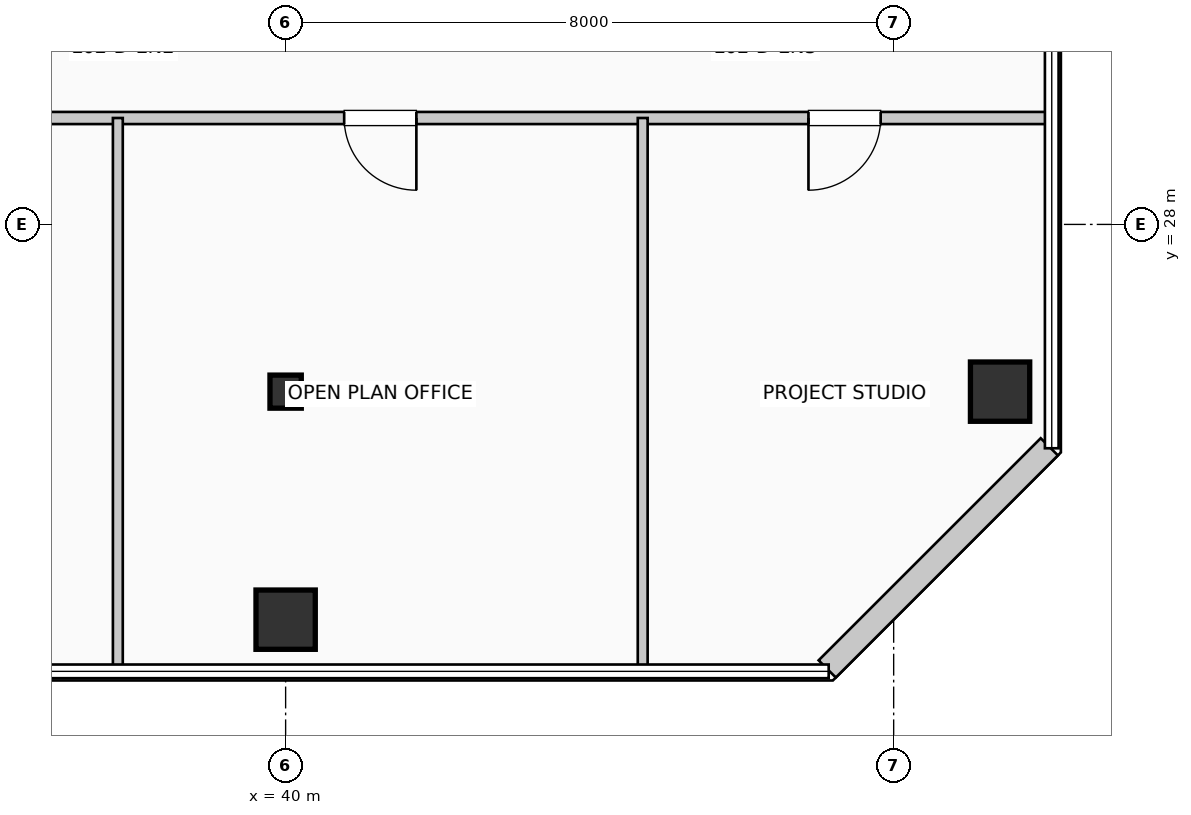
"""IFC4 building model, lengths in metres.
Left out: names, types, materials, properties, quantities, classifications, styles, units other than length and angle.
Written with IfcOpenShell. Run it as: python <this file> out.ifc"""

import sys

from ifc_helpers import new_model, si_unit, direction, frame, frame_2d, origin, origin_2d, place, context, subcontext, project, spatial, rectangle, i_section, extrude, element, fill, save


model = new_model("IFC4")
c1 = context("Model", 3, precision=1e-05, world=origin(), true_north=direction((0.0, 1.0)))
c2 = subcontext(c1, "Body", "Model", "MODEL_VIEW")
j1 = project(units=[si_unit("LENGTHUNIT", "METRE"), si_unit("PLANEANGLEUNIT", "RADIAN")], contexts=[c1])
p1 = place(None, origin())
s1 = spatial("IfcSite", under=j1, at=p1, CompositionType="ELEMENT")
p2 = place(p1, origin())
s2 = spatial("IfcBuilding", under=s1, at=p2, CompositionType="ELEMENT")
p3 = place(p2, frame((0.0, 0.0, 256.41)))
s3 = spatial("IfcBuildingStorey", under=s2, at=p3, CompositionType="ELEMENT", Elevation=256.41)
p4 = place(p3, frame((40.0, 22.8, 0.0), z_axis=(0.0, 0.0, 1.0), x_axis=(1.0, 0.0, 0.0)))
e1 = element("IfcColumn", 1, at=p4, inside=s3, PredefinedType="COLUMN", context=c2, shape_type="SweptSolid", body=[
    extrude(rectangle(XDim=0.78, YDim=0.78, at=origin_2d()), origin(), (0.0, 0.0, 1.0), 3.96),
])
p5 = place(p3, frame((40.0, 25.8, 0.0), z_axis=(0.0, 0.0, 1.0), x_axis=(1.0, 0.0, 0.0)))
e2 = element("IfcColumn", 2, at=p5, inside=s3, PredefinedType="COLUMN", context=c2, shape_type="SweptSolid", body=[
    extrude(i_section(OverallWidth=0.412, OverallDepth=0.435, WebThickness=0.027, FlangeThickness=0.043, at=origin_2d()), origin(), (0.0, 0.0, 1.0), 3.96),
])
p6 = place(p3, frame((49.4, 25.8, 0.0), z_axis=(0.0, 0.0, 1.0), x_axis=(1.0, 0.0, 0.0)))
e3 = element("IfcColumn", 3, at=p6, inside=s3, PredefinedType="COLUMN", context=c2, shape_type="SweptSolid", body=[
    extrude(rectangle(XDim=0.78, YDim=0.78, at=origin_2d()), origin(), (0.0, 0.0, 1.0), 3.96),
])
p7 = place(p3, frame((47.126, 22.152, 0.0), z_axis=(0.0, 0.0, 1.0), x_axis=(0.707136318428, 0.707077242712, 0.0)))
e4 = element("IfcWall", 4, at=p7, inside=s3, PredefinedType="SOLIDWALL", context=c2, shape_type="SweptSolid", body=[
    extrude(rectangle(XDim=4.133, YDim=0.32, at=frame_2d((2.066, 0.0))), origin(), (0.0, 0.0, 1.0), 3.71),
])
p8 = place(p3, frame((23.45, 29.4, 0.0), z_axis=(0.0, 0.0, 1.0), x_axis=(1.0, 0.0, 0.0)))
e5 = element("IfcWall", 5, at=p8, inside=s3, PredefinedType="PARTITIONING", context=c2, shape_type="SweptSolid", body=[
    extrude(rectangle(XDim=26.56, YDim=0.16, at=frame_2d((13.28, 0.0))), origin(), (0.0, 0.0, 1.0), 3.365),
])
p9 = place(p8, frame((3.928, 0.0, 0.0), z_axis=(0.0, 0.0, 1.0), x_axis=(-1.0, 0.0, 0.0)))
e6 = element("IfcOpeningElement", 6, at=p9, cuts=e5, PredefinedType="OPENING", context=c2, shape_type="SweptSolid", body=[
    extrude(rectangle(XDim=0.95, YDim=2.15, at=frame_2d((0.475, 1.075))), frame((0.0, 0.09, 0.0), z_axis=(0.0, -1.0, 0.0), x_axis=(1.0, 0.0, 0.0)), (0.0, 0.0, 1.0), 0.18),
])
p10 = place(p8, frame((11.099, 0.0, 0.0), z_axis=(0.0, 0.0, 1.0), x_axis=(-1.0, 0.0, 0.0)))
e7 = element("IfcOpeningElement", 7, at=p10, cuts=e5, PredefinedType="OPENING", context=c2, shape_type="SweptSolid", body=[
    extrude(rectangle(XDim=0.95, YDim=2.15, at=frame_2d((0.475, 1.075))), frame((0.0, 0.09, 0.0), z_axis=(0.0, -1.0, 0.0), x_axis=(1.0, 0.0, 0.0)), (0.0, 0.0, 1.0), 0.18),
])
p11 = place(p8, frame((18.27, 0.0, 0.0), z_axis=(0.0, 0.0, 1.0), x_axis=(-1.0, 0.0, 0.0)))
e8 = element("IfcOpeningElement", 8, at=p11, cuts=e5, PredefinedType="OPENING", context=c2, shape_type="SweptSolid", body=[
    extrude(rectangle(XDim=0.95, YDim=2.15, at=frame_2d((0.475, 1.075))), frame((0.0, 0.09, 0.0), z_axis=(0.0, -1.0, 0.0), x_axis=(1.0, 0.0, 0.0)), (0.0, 0.0, 1.0), 0.18),
])
p12 = place(p8, frame((24.379, 0.0, 0.0), z_axis=(0.0, 0.0, 1.0), x_axis=(-1.0, 0.0, 0.0)))
e9 = element("IfcOpeningElement", 9, at=p12, cuts=e5, PredefinedType="OPENING", context=c2, shape_type="SweptSolid", body=[
    extrude(rectangle(XDim=0.95, YDim=2.15, at=frame_2d((0.475, 1.075))), frame((0.0, 0.09, 0.0), z_axis=(0.0, -1.0, 0.0), x_axis=(1.0, 0.0, 0.0)), (0.0, 0.0, 1.0), 0.18),
])
for number, where, z_axis, x_axis in (
    (10, (37.792, 22.19, 0.0), (0.0, 0.0, 1.0), (0.0, 1.0, 0.0)),
    (11, (44.698, 22.19, 0.0), (0.0, 0.0, 1.0), (0.0, 1.0, 0.0)),
):
    element("IfcWall", number, at=place(p3, frame(where, z_axis=z_axis, x_axis=x_axis)), inside=s3, PredefinedType="PARTITIONING", context=c2, shape_type="SweptSolid", body=[
        extrude(rectangle(XDim=7.21, YDim=0.13, at=frame_2d((3.605, 0.0))), origin(), (0.0, 0.0, 1.0), 3.71),
    ])
p13 = place(p11, origin())
e12 = element("IfcDoor", 12, at=p13, inside=s3, OperationType="SINGLE_SWING_RIGHT", PredefinedType="DOOR", context=c2, shape_type="SweptSolid", body=[
    extrude(rectangle(XDim=0.95, YDim=2.15, at=frame_2d((0.475, 1.075))), frame((0.0, 0.025, 0.0), z_axis=(0.0, -1.0, 0.0), x_axis=(1.0, 0.0, 0.0)), (0.0, 0.0, 1.0), 0.05),
])
fill(e8, e12)
p14 = place(p12, origin())
e13 = element("IfcDoor", 13, at=p14, inside=s3, OperationType="SINGLE_SWING_LEFT", PredefinedType="DOOR", context=c2, shape_type="SweptSolid", body=[
    extrude(rectangle(XDim=0.95, YDim=2.15, at=frame_2d((0.475, 1.075))), frame((0.0, 0.025, 0.0), z_axis=(0.0, -1.0, 0.0), x_axis=(1.0, 0.0, 0.0)), (0.0, 0.0, 1.0), 0.05),
])
fill(e9, e13)
save(model, sys.argv[1])
